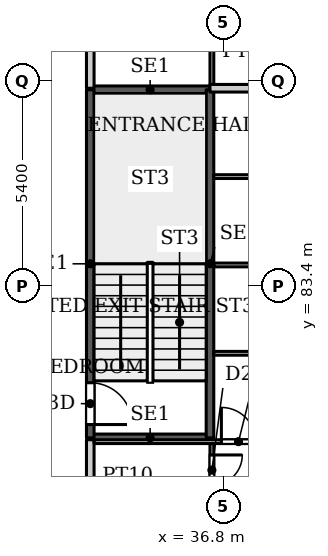
"""IFC4 building model, lengths in metres.
Left out: names, types, materials, properties, quantities, classifications, styles, units other than length and angle.
Written with IfcOpenShell. Run it as: python <this file> out.ifc"""

import sys

from ifc_helpers import new_model, si_unit, direction, frame, frame_2d, origin, place, context, subcontext, project, spatial, rectangle, extrude, source, transform, mapped, element, fill, save


model = new_model("IFC4")
c1 = context("Model", 3, precision=1e-05, world=origin(), true_north=direction((0.0, 1.0)))
c2 = subcontext(c1, "Body", "Model", "MODEL_VIEW")
j1 = project(units=[si_unit("LENGTHUNIT", "METRE"), si_unit("PLANEANGLEUNIT", "RADIAN")], contexts=[c1])
p1 = place(None, origin())
s1 = spatial("IfcSite", under=j1, at=p1, CompositionType="ELEMENT")
p2 = place(p1, origin())
s2 = spatial("IfcBuilding", under=s1, at=p2, CompositionType="ELEMENT")
p3 = place(p2, frame((0.0, 0.0, 125.3)))
s3 = spatial("IfcBuildingStorey", under=s2, at=p3, CompositionType="ELEMENT", Elevation=125.3)
for number, where, z_axis, x_axis in (
    (1, (33.3, 79.4, 0.0), (0.0, 0.0, 1.0), (1.0, 0.0, 0.0)),
    (2, (33.3, 88.56, 0.0), (0.0, 0.0, 1.0), (1.0, 0.0, 0.0)),
):
    element("IfcWall", number, at=place(p3, frame(where, z_axis=z_axis, x_axis=x_axis)), inside=s3, PredefinedType="SHEAR", context=c2, shape_type="SweptSolid", body=[
        extrude(rectangle(XDim=3.15, YDim=0.2, at=frame_2d((1.575, 0.0))), origin(), (0.0, 0.0, 1.0), 3.9),
    ])
p4 = place(p3, frame((33.3, 79.4, 0.0), z_axis=(0.0, 0.0, 1.0), x_axis=(0.0, 1.0, 0.0)))
e3 = element("IfcWall", 3, at=p4, inside=s3, PredefinedType="SHEAR", context=c2, shape_type="SweptSolid", body=[
    extrude(rectangle(XDim=9.16, YDim=0.2, at=frame_2d((4.58, 0.0))), origin(), (0.0, 0.0, 1.0), 3.9),
])
p5 = place(p4, frame((0.35, 0.0, 0.0)))
e4 = element("IfcOpeningElement", 4, at=p5, cuts=e3, PredefinedType="OPENING", context=c2, shape_type="SweptSolid", body=[
    extrude(rectangle(XDim=1.1, YDim=2.2, at=frame_2d((0.55, 1.1))), frame((0.0, 0.11, 0.0), z_axis=(0.0, -1.0, 0.0), x_axis=(1.0, 0.0, 0.0)), (0.0, 0.0, 1.0), 0.22),
])
p6 = place(p3, frame((36.45, 79.4, 0.0), z_axis=(0.0, 0.0, 1.0), x_axis=(0.0, 1.0, 0.0)))
e5 = element("IfcWall", 5, at=p6, inside=s3, PredefinedType="SHEAR", context=c2, shape_type="SweptSolid", body=[
    extrude(rectangle(XDim=9.16, YDim=0.2, at=frame_2d((4.58, 0.0))), origin(), (0.0, 0.0, 1.0), 3.9),
])
p7 = place(p3, frame((33.3, 54.4, 0.0), z_axis=(0.0, 0.0, 1.0), x_axis=(0.0, 1.0, 0.0)))
e6 = element("IfcWall", 6, at=p7, inside=s3, PredefinedType="PARTITIONING", context=c2, shape_type="SweptSolid", body=[
    extrude(rectangle(XDim=24.95, YDim=0.2, at=frame_2d((12.475, 0.0))), origin(), (0.0, 0.0, 1.0), 3.6),
])
p8 = place(p7, frame((0.25, 0.0, 0.0)))
e7 = element("IfcOpeningElement", 7, at=p8, cuts=e6, PredefinedType="OPENING", context=c2, shape_type="SweptSolid", body=[
    extrude(rectangle(XDim=1.0, YDim=2.1, at=frame_2d((0.5, 1.05))), frame((0.0, 0.11, 0.0), z_axis=(0.0, -1.0, 0.0), x_axis=(1.0, 0.0, 0.0)), (0.0, 0.0, 1.0), 0.22),
])
p9 = place(p7, frame((20.5, 0.0, 0.0)))
e8 = element("IfcOpeningElement", 8, at=p9, cuts=e6, PredefinedType="OPENING", context=c2, shape_type="SweptSolid", body=[
    extrude(rectangle(XDim=1.0, YDim=2.1, at=frame_2d((0.5, 1.05))), frame((0.0, 0.11, 0.0), z_axis=(0.0, -1.0, 0.0), x_axis=(1.0, 0.0, 0.0)), (0.0, 0.0, 1.0), 0.22),
])
p10 = place(p3, frame((33.3, 88.6, 0.0), z_axis=(0.0, 0.0, 1.0), x_axis=(0.0, 1.0, 0.0)))
e9 = element("IfcWall", 9, at=p10, inside=s3, PredefinedType="PARTITIONING", context=c2, shape_type="SweptSolid", body=[
    extrude(rectangle(XDim=5.175, YDim=0.2, at=frame_2d((2.587, 0.0))), origin(), (0.0, 0.0, 1.0), 3.6),
])
p11 = place(p10, frame((3.7, 0.0, 0.0)))
e10 = element("IfcOpeningElement", 10, at=p11, cuts=e9, PredefinedType="OPENING", context=c2, shape_type="SweptSolid", body=[
    extrude(rectangle(XDim=1.0, YDim=2.1, at=frame_2d((0.5, 1.05))), frame((0.0, 0.11, 0.0), z_axis=(0.0, -1.0, 0.0), x_axis=(1.0, 0.0, 0.0)), (0.0, 0.0, 1.0), 0.22),
])
p12 = place(p3, frame((33.4, 79.3, 0.0), z_axis=(0.0, 0.0, 1.0), x_axis=(1.0, 0.0, 0.0)))
e11 = element("IfcWall", 11, at=p12, inside=s3, PredefinedType="PARTITIONING", context=c2, shape_type="SweptSolid", body=[
    extrude(rectangle(XDim=12.5, YDim=0.1, at=frame_2d((6.25, 0.0))), origin(), (0.0, 0.0, 1.0), 3.6),
])
p13 = place(p12, frame((3.35, 0.0, 0.0)))
e12 = element("IfcOpeningElement", 12, at=p13, cuts=e11, PredefinedType="OPENING", context=c2, shape_type="SweptSolid", body=[
    extrude(rectangle(XDim=0.9, YDim=2.1, at=frame_2d((0.45, 1.05))), frame((0.0, 0.06, 0.0), z_axis=(0.0, -1.0, 0.0), x_axis=(1.0, 0.0, 0.0)), (0.0, 0.0, 1.0), 0.12),
])
p14 = place(p3, frame((36.45, 88.6, 0.0), z_axis=(0.0, 0.0, 1.0), x_axis=(1.0, 0.0, 0.0)))
e13 = element("IfcWall", 13, at=p14, inside=s3, PredefinedType="PARTITIONING", context=c2, shape_type="SweptSolid", body=[
    extrude(rectangle(XDim=9.45, YDim=0.2, at=frame_2d((4.725, 0.0))), origin(), (0.0, 0.0, 1.0), 2.5),
])
p15 = place(p3, frame((36.5, 76.375, 0.0), z_axis=(0.0, 0.0, 1.0), x_axis=(0.0, 1.0, 0.0)))
e14 = element("IfcWall", 14, at=p15, inside=s3, PredefinedType="PARTITIONING", context=c2, shape_type="SweptSolid", body=[
    extrude(rectangle(XDim=2.875, YDim=0.1, at=frame_2d((1.438, 0.0))), origin(), (0.0, 0.0, 1.0), 3.6),
])
p16 = place(p15, frame((1.775, 0.0, 0.0)))
e15 = element("IfcOpeningElement", 15, at=p16, cuts=e14, PredefinedType="OPENING", context=c2, shape_type="SweptSolid", body=[
    extrude(rectangle(XDim=0.8, YDim=2.1, at=frame_2d((0.4, 1.05))), frame((0.0, 0.06, 0.0), z_axis=(0.0, -1.0, 0.0), x_axis=(1.0, 0.0, 0.0)), (0.0, 0.0, 1.0), 0.12),
])
p17 = place(p3, frame((36.5, 88.7, 0.0), z_axis=(0.0, 0.0, 1.0), x_axis=(0.0, 1.0, 0.0)))
e16 = element("IfcWall", 16, at=p17, inside=s3, PredefinedType="PARTITIONING", context=c2, shape_type="SweptSolid", body=[
    extrude(rectangle(XDim=3.25, YDim=0.1, at=frame_2d((1.625, 0.0))), origin(), (0.0, 0.0, 1.0), 3.6),
])
p18 = place(p17, frame((1.1, 0.0, 0.0)))
e17 = element("IfcOpeningElement", 17, at=p18, cuts=e16, PredefinedType="OPENING", context=c2, shape_type="SweptSolid", body=[
    extrude(rectangle(XDim=0.9, YDim=2.1, at=frame_2d((0.45, 1.05))), frame((0.0, 0.06, 0.0), z_axis=(0.0, -1.0, 0.0), x_axis=(1.0, 0.0, 0.0)), (0.0, 0.0, 1.0), 0.12),
])
p19 = place(p3, frame((36.549, 81.625, 0.0), z_axis=(0.0, 0.0, 1.0), x_axis=(1.0, 0.0, 0.0)))
e18 = element("IfcWall", 18, at=p19, inside=s3, PredefinedType="PARTITIONING", context=c2, shape_type="SweptSolid", body=[
    extrude(rectangle(XDim=9.351, YDim=0.1, at=frame_2d((4.675, 0.0))), origin(), (0.0, 0.0, 1.0), 3.6),
])
p20 = place(p19, frame((4.176, 0.0, 0.0)))
e19 = element("IfcOpeningElement", 19, at=p20, cuts=e18, PredefinedType="OPENING", context=c2, shape_type="SweptSolid", body=[
    extrude(rectangle(XDim=0.9, YDim=2.1, at=frame_2d((0.45, 1.05))), frame((0.0, 0.06, 0.0), z_axis=(0.0, -1.0, 0.0), x_axis=(1.0, 0.0, 0.0)), (0.0, 0.0, 1.0), 0.12),
])
p21 = place(p3, frame((36.549, 83.95, 0.0), z_axis=(0.0, 0.0, 1.0), x_axis=(1.0, 0.0, 0.0)))
e20 = element("IfcWall", 20, at=p21, inside=s3, PredefinedType="PARTITIONING", context=c2, shape_type="SweptSolid", body=[
    extrude(rectangle(XDim=9.351, YDim=0.1, at=frame_2d((4.675, 0.0))), origin(), (0.0, 0.0, 1.0), 3.6),
])
p22 = place(p21, frame((4.176, 0.0, 0.0)))
e21 = element("IfcOpeningElement", 21, at=p22, cuts=e20, PredefinedType="OPENING", context=c2, shape_type="SweptSolid", body=[
    extrude(rectangle(XDim=0.9, YDim=2.1, at=frame_2d((0.45, 1.05))), frame((0.0, 0.06, 0.0), z_axis=(0.0, -1.0, 0.0), x_axis=(1.0, 0.0, 0.0)), (0.0, 0.0, 1.0), 0.12),
])
p23 = place(p3, frame((36.549, 86.275, 0.0), z_axis=(0.0, 0.0, 1.0), x_axis=(1.0, 0.0, 0.0)))
e22 = element("IfcWall", 22, at=p23, inside=s3, PredefinedType="PARTITIONING", context=c2, shape_type="SweptSolid", body=[
    extrude(rectangle(XDim=9.351, YDim=0.1, at=frame_2d((4.675, 0.0))), origin(), (0.0, 0.0, 1.0), 3.6),
])
p24 = place(p23, frame((4.176, 0.0, 0.0)))
e23 = element("IfcOpeningElement", 23, at=p24, cuts=e22, PredefinedType="OPENING", context=c2, shape_type="SweptSolid", body=[
    extrude(rectangle(XDim=0.9, YDim=2.1, at=frame_2d((0.45, 1.05))), frame((0.0, 0.06, 0.0), z_axis=(0.0, -1.0, 0.0), x_axis=(1.0, 0.0, 0.0)), (0.0, 0.0, 1.0), 0.12),
])
m1 = source(origin(), c2, "Body", "SweptSolid", [
    extrude(rectangle(XDim=1.1, YDim=2.2, at=frame_2d((0.55, 1.1))), frame((0.0, 0.025, 0.0), z_axis=(0.0, -1.0, 0.0), x_axis=(1.0, 0.0, 0.0)), (0.0, 0.0, 1.0), 0.05),
])
p25 = place(p5, origin())
e24 = element("IfcDoor", 24, at=p25, inside=s3, OperationType="SINGLE_SWING_RIGHT", PredefinedType="DOOR", context=c2, shape_type="MappedRepresentation", body=[
    mapped(m1, transform((0.0, 0.0, 0.0), x_axis=(1.0, 0.0, 0.0), y_axis=(0.0, 1.0, 0.0), z_axis=(0.0, 0.0, 1.0), scale=1.0)),
])
fill(e4, e24)
m2 = source(origin(), c2, "Body", "SweptSolid", [
    extrude(rectangle(XDim=0.8, YDim=2.1, at=frame_2d((0.4, 1.05))), frame((0.0, 0.025, 0.0), z_axis=(0.0, -1.0, 0.0), x_axis=(1.0, 0.0, 0.0)), (0.0, 0.0, 1.0), 0.05),
])
p26 = place(p16, origin())
e25 = element("IfcDoor", 25, at=p26, inside=s3, OperationType="SINGLE_SWING_RIGHT", PredefinedType="DOOR", context=c2, shape_type="MappedRepresentation", body=[
    mapped(m2, transform((0.0, 0.0, 0.0), x_axis=(1.0, 0.0, 0.0), y_axis=(0.0, 1.0, 0.0), z_axis=(0.0, 0.0, 1.0), scale=1.0)),
])
fill(e15, e25)
m3 = source(origin(), c2, "Body", "SweptSolid", [
    extrude(rectangle(XDim=0.9, YDim=2.1, at=frame_2d((0.45, 1.05))), frame((0.0, 0.025, 0.0), z_axis=(0.0, -1.0, 0.0), x_axis=(1.0, 0.0, 0.0)), (0.0, 0.0, 1.0), 0.05),
])
p27 = place(p13, origin())
e26 = element("IfcDoor", 26, at=p27, inside=s3, OperationType="SINGLE_SWING_LEFT", PredefinedType="DOOR", context=c2, shape_type="MappedRepresentation", body=[
    mapped(m3, transform((0.0, 0.0, 0.0), x_axis=(1.0, 0.0, 0.0), y_axis=(0.0, 1.0, 0.0), z_axis=(0.0, 0.0, 1.0), scale=1.0)),
])
fill(e12, e26)
save(model, sys.argv[1])
